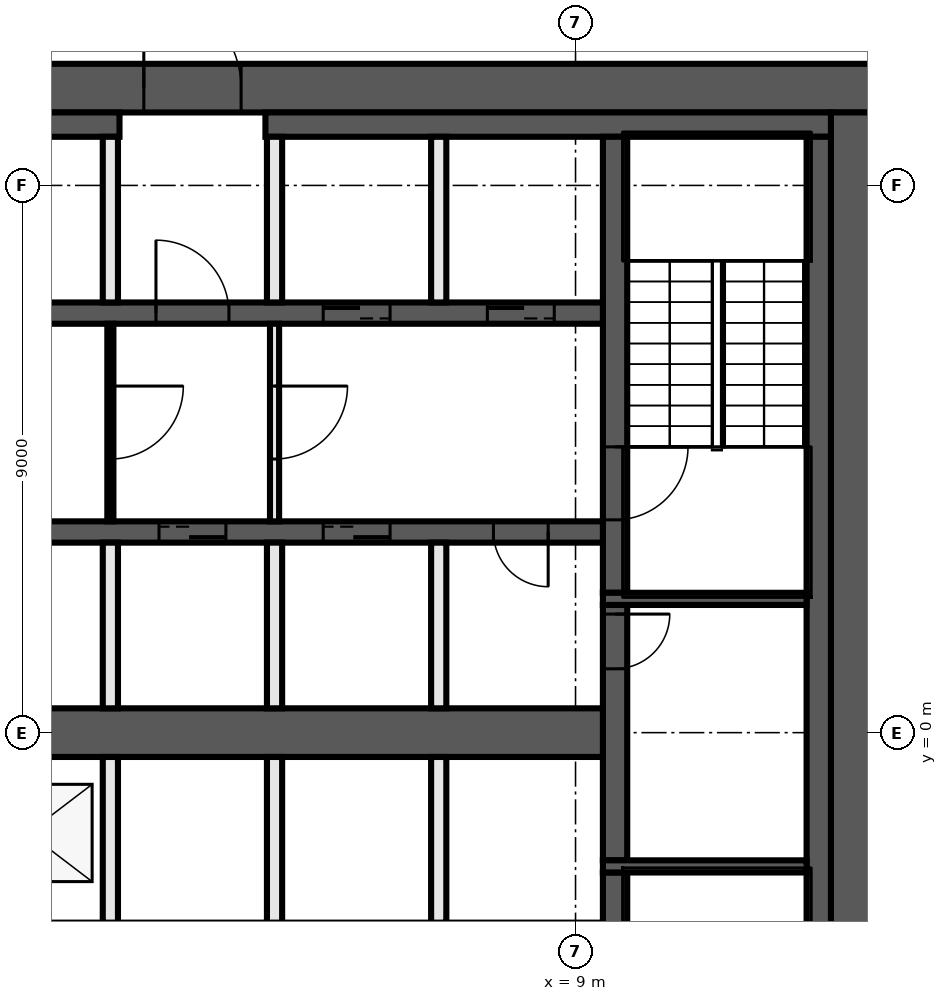
"""IFC4 building model, lengths in metres.
Left out: names, types, materials, properties, quantities, classifications, styles, units other than length and angle.
Written with IfcOpenShell. Run it as: python <this file> out.ifc"""

import sys

from ifc_helpers import new_model, si_unit, direction, frame, frame_2d, origin, place, context, subcontext, project, spatial, rectangle, extrude, element, fill, save


model = new_model("IFC4")
c1 = context("Model", 3, precision=1e-05, world=origin(), true_north=direction((0.0, 1.0)))
c2 = subcontext(c1, "Body", "Model", "MODEL_VIEW")
j1 = project(units=[si_unit("LENGTHUNIT", "METRE"), si_unit("PLANEANGLEUNIT", "RADIAN")], contexts=[c1])
p1 = place(None, origin())
s1 = spatial("IfcSite", under=j1, at=p1, CompositionType="ELEMENT")
p2 = place(p1, origin())
s2 = spatial("IfcBuilding", under=s1, at=p2, CompositionType="ELEMENT")
p3 = place(p2, frame((0.0, 0.0, 151.6)))
s3 = spatial("IfcBuildingStorey", under=s2, at=p3, CompositionType="ELEMENT", Elevation=151.6)
p4 = place(p3, frame((-14.0, 10.6, 0.0), z_axis=(0.0, 0.0, 1.0), x_axis=(1.0, 0.0, 0.0)))
e1 = element("IfcWall", 1, at=p4, inside=s3, PredefinedType="SHEAR", context=c2, shape_type="SweptSolid", body=[
    extrude(rectangle(XDim=28.0, YDim=0.8, at=frame_2d((14.0, 0.0))), origin(), (0.0, 0.0, 1.0), 6.62),
])
p5 = place(p4, frame((15.9, 0.0, 0.0)))
e2 = element("IfcOpeningElement", 2, at=p5, cuts=e1, PredefinedType="OPENING", context=c2, shape_type="SweptSolid", body=[
    extrude(rectangle(XDim=1.6, YDim=2.1, at=frame_2d((0.8, 1.05))), frame((0.0, 0.41, 0.0), z_axis=(0.0, -1.0, 0.0), x_axis=(1.0, 0.0, 0.0)), (0.0, 0.0, 1.0), 0.82),
])
p6 = place(p3, frame((13.6, 10.2, 0.0), z_axis=(0.0, 0.0, 1.0), x_axis=(0.0, -1.0, 0.0)))
e3 = element("IfcWall", 3, at=p6, inside=s3, PredefinedType="SHEAR", context=c2, shape_type="SweptSolid", body=[
    extrude(rectangle(XDim=20.4, YDim=0.8, at=frame_2d((10.2, 0.0))), origin(), (0.0, 0.0, 1.0), 6.62),
])
p7 = place(p3, frame((-13.2, 10.0, 0.0), z_axis=(0.0, 0.0, 1.0), x_axis=(1.0, 0.0, 0.0)))
e4 = element("IfcWall", 4, at=p7, inside=s3, PredefinedType="SHEAR", context=c2, shape_type="SweptSolid", body=[
    extrude(rectangle(XDim=14.7, YDim=0.4, at=frame_2d((7.35, 0.0))), origin(), (0.0, 0.0, 1.0), 6.62),
])
p8 = place(p3, frame((3.9, 10.0, 0.0), z_axis=(0.0, 0.0, 1.0), x_axis=(1.0, 0.0, 0.0)))
e5 = element("IfcWall", 5, at=p8, inside=s3, PredefinedType="SHEAR", context=c2, shape_type="SweptSolid", body=[
    extrude(rectangle(XDim=9.3, YDim=0.4, at=frame_2d((4.65, 0.0))), origin(), (0.0, 0.0, 1.0), 6.62),
])
p9 = place(p3, frame((13.0, 9.8, 0.0), z_axis=(0.0, 0.0, 1.0), x_axis=(0.0, -1.0, 0.0)))
e6 = element("IfcWall", 6, at=p9, inside=s3, PredefinedType="SHEAR", context=c2, shape_type="SweptSolid", body=[
    extrude(rectangle(XDim=19.6, YDim=0.4, at=frame_2d((9.8, 0.0))), origin(), (0.0, 0.0, 1.0), 6.62),
])
p10 = place(p3, frame((9.65, -2.3, 0.0), z_axis=(0.0, 0.0, 1.0), x_axis=(0.0, -1.0, 0.0)))
e7 = element("IfcWall", 7, at=p10, inside=s3, PredefinedType="SHEAR", context=c2, shape_type="SweptSolid", body=[
    extrude(rectangle(XDim=7.5, YDim=0.4, at=frame_2d((3.75, 0.0))), origin(), (0.0, 0.0, 1.0), 6.62),
])
p11 = place(p10, frame((1.2, 0.0, 0.0)))
e8 = element("IfcOpeningElement", 8, at=p11, cuts=e7, PredefinedType="OPENING", context=c2, shape_type="SweptSolid", body=[
    extrude(rectangle(XDim=1.2, YDim=2.1, at=frame_2d((0.6, 1.05))), frame((0.0, 0.21, 0.0), z_axis=(0.0, -1.0, 0.0), x_axis=(1.0, 0.0, 0.0)), (0.0, 0.0, 1.0), 0.42),
])
p12 = place(p3, frame((9.65, 2.1, 0.0), z_axis=(0.0, 0.0, 1.0), x_axis=(0.0, -1.0, 0.0)))
e9 = element("IfcWall", 9, at=p12, inside=s3, PredefinedType="SHEAR", context=c2, shape_type="SweptSolid", body=[
    extrude(rectangle(XDim=4.2, YDim=0.4, at=frame_2d((2.1, 0.0))), origin(), (0.0, 0.0, 1.0), 6.62),
])
p13 = place(p12, frame((0.15, 0.0, 0.0)))
e10 = element("IfcOpeningElement", 10, at=p13, cuts=e9, PredefinedType="OPENING", context=c2, shape_type="SweptSolid", body=[
    extrude(rectangle(XDim=0.9, YDim=2.1, at=frame_2d((0.45, 1.05))), frame((0.0, 0.21, 0.0), z_axis=(0.0, -1.0, 0.0), x_axis=(1.0, 0.0, 0.0)), (0.0, 0.0, 1.0), 0.42),
])
p14 = place(p3, frame((9.65, 9.8, 0.0), z_axis=(0.0, 0.0, 1.0), x_axis=(0.0, -1.0, 0.0)))
e11 = element("IfcWall", 11, at=p14, inside=s3, PredefinedType="SHEAR", context=c2, shape_type="SweptSolid", body=[
    extrude(rectangle(XDim=7.5, YDim=0.4, at=frame_2d((3.75, 0.0))), origin(), (0.0, 0.0, 1.0), 6.62),
])
p15 = place(p14, frame((5.1, 0.0, 0.0)))
e12 = element("IfcOpeningElement", 12, at=p15, cuts=e11, PredefinedType="OPENING", context=c2, shape_type="SweptSolid", body=[
    extrude(rectangle(XDim=1.2, YDim=2.1, at=frame_2d((0.6, 1.05))), frame((0.0, 0.21, 0.0), z_axis=(0.0, -1.0, 0.0), x_axis=(1.0, 0.0, 0.0)), (0.0, 0.0, 1.0), 0.42),
])
for number, where, z_axis, x_axis in (
    (13, (9.45, 2.2, 0.0), (0.0, 0.0, 1.0), (1.0, 0.0, 0.0)),
    (14, (9.45, -2.2, 0.0), (0.0, 0.0, 1.0), (1.0, 0.0, 0.0)),
):
    element("IfcWall", number, at=place(p3, frame(where, z_axis=z_axis, x_axis=x_axis)), inside=s3, PredefinedType="SHEAR", context=c2, shape_type="SweptSolid", body=[
        extrude(rectangle(XDim=3.35, YDim=0.2, at=frame_2d((1.675, 0.0))), origin(), (0.0, 0.0, 1.0), 6.62),
    ])
p16 = place(p3, frame((-9.45, 6.9, 0.0), z_axis=(0.0, 0.0, 1.0), x_axis=(1.0, 0.0, 0.0)))
e15 = element("IfcWall", 15, at=p16, inside=s3, PredefinedType="SHEAR", context=c2, shape_type="SweptSolid", body=[
    extrude(rectangle(XDim=18.9, YDim=0.35, at=frame_2d((9.45, 0.0))), origin(), (0.0, 0.0, 1.0), 6.62),
])
p17 = place(p16, frame((11.55, 0.0, 0.0)))
e16 = element("IfcOpeningElement", 16, at=p17, cuts=e15, PredefinedType="OPENING", context=c2, shape_type="SweptSolid", body=[
    extrude(rectangle(XDim=1.2, YDim=2.1, at=frame_2d((0.6, 1.05))), frame((0.0, 0.185, 0.0), z_axis=(0.0, -1.0, 0.0), x_axis=(1.0, 0.0, 0.0)), (0.0, 0.0, 1.0), 0.37),
])
p18 = place(p16, frame((14.3, 0.0, 0.0)))
e17 = element("IfcOpeningElement", 17, at=p18, cuts=e15, PredefinedType="OPENING", context=c2, shape_type="SweptSolid", body=[
    extrude(rectangle(XDim=1.1, YDim=2.1, at=frame_2d((0.55, 1.05))), frame((0.0, 0.185, 0.0), z_axis=(0.0, -1.0, 0.0), x_axis=(1.0, 0.0, 0.0)), (0.0, 0.0, 1.0), 0.37),
])
p19 = place(p16, frame((17.0, 0.0, 0.0)))
e18 = element("IfcOpeningElement", 18, at=p19, cuts=e15, PredefinedType="OPENING", context=c2, shape_type="SweptSolid", body=[
    extrude(rectangle(XDim=1.1, YDim=2.1, at=frame_2d((0.55, 1.05))), frame((0.0, 0.185, 0.0), z_axis=(0.0, -1.0, 0.0), x_axis=(1.0, 0.0, 0.0)), (0.0, 0.0, 1.0), 0.37),
])
p20 = place(p3, frame((9.45, 3.3, 0.0), z_axis=(0.0, 0.0, 1.0), x_axis=(-1.0, 0.0, 0.0)))
e19 = element("IfcWall", 19, at=p20, inside=s3, PredefinedType="SHEAR", context=c2, shape_type="SweptSolid", body=[
    extrude(rectangle(XDim=18.9, YDim=0.35, at=frame_2d((9.45, 0.0))), origin(), (0.0, 0.0, 1.0), 6.62),
])
p21 = place(p20, frame((6.2, 0.0, 0.0)))
e20 = element("IfcOpeningElement", 20, at=p21, cuts=e19, PredefinedType="OPENING", context=c2, shape_type="SweptSolid", body=[
    extrude(rectangle(XDim=1.1, YDim=2.1, at=frame_2d((0.55, 1.05))), frame((0.0, 0.185, 0.0), z_axis=(0.0, -1.0, 0.0), x_axis=(1.0, 0.0, 0.0)), (0.0, 0.0, 1.0), 0.37),
])
p22 = place(p20, frame((3.5, 0.0, 0.0)))
e21 = element("IfcOpeningElement", 21, at=p22, cuts=e19, PredefinedType="OPENING", context=c2, shape_type="SweptSolid", body=[
    extrude(rectangle(XDim=1.1, YDim=2.1, at=frame_2d((0.55, 1.05))), frame((0.0, 0.185, 0.0), z_axis=(0.0, -1.0, 0.0), x_axis=(1.0, 0.0, 0.0)), (0.0, 0.0, 1.0), 0.37),
])
p23 = place(p20, frame((0.9, 0.0, 0.0)))
e22 = element("IfcOpeningElement", 22, at=p23, cuts=e19, PredefinedType="OPENING", context=c2, shape_type="SweptSolid", body=[
    extrude(rectangle(XDim=0.9, YDim=2.1, at=frame_2d((0.45, 1.05))), frame((0.0, 0.185, 0.0), z_axis=(0.0, -1.0, 0.0), x_axis=(1.0, 0.0, 0.0)), (0.0, 0.0, 1.0), 0.37),
])
p24 = place(p3, frame((-9.45, 0.0, 0.0), z_axis=(0.0, 0.0, 1.0), x_axis=(1.0, 0.0, 0.0)))
e23 = element("IfcWall", 23, at=p24, inside=s3, PredefinedType="SHEAR", context=c2, shape_type="SweptSolid", body=[
    extrude(rectangle(XDim=18.9, YDim=0.8, at=frame_2d((9.45, 0.0))), origin(), (0.0, 0.0, 1.0), 6.62),
])
for number, where, z_axis, x_axis in (
    (24, (6.75, -3.125, 0.0), (0.0, 0.0, 1.0), (0.0, 1.0, 0.0)),
    (25, (6.75, 0.4, 0.0), (0.0, 0.0, 1.0), (0.0, 1.0, 0.0)),
    (26, (6.75, 7.075, 0.0), (0.0, 0.0, 1.0), (0.0, 1.0, 0.0)),
):
    element("IfcWall", number, at=place(p3, frame(where, z_axis=z_axis, x_axis=x_axis)), inside=s3, PredefinedType="SOLIDWALL", context=c2, shape_type="SweptSolid", body=[
        extrude(rectangle(XDim=2.725, YDim=0.25, at=frame_2d((1.363, 0.0))), origin(), (0.0, 0.0, 1.0), 6.62),
    ])
p25 = place(p3, frame((4.05, 6.725, 0.0), z_axis=(0.0, 0.0, 1.0), x_axis=(0.0, -1.0, 0.0)))
e27 = element("IfcWall", 27, at=p25, inside=s3, PredefinedType="PARTITIONING", context=c2, shape_type="SweptSolid", body=[
    extrude(rectangle(XDim=3.25, YDim=0.15, at=frame_2d((1.625, 0.0))), origin(), (0.0, 0.0, 1.0), 6.62),
])
p26 = place(p25, frame((1.025, 0.0, 0.0)))
e28 = element("IfcOpeningElement", 28, at=p26, cuts=e27, PredefinedType="OPENING", context=c2, shape_type="SweptSolid", body=[
    extrude(rectangle(XDim=1.2, YDim=2.1, at=frame_2d((0.6, 1.05))), frame((0.0, 0.085, 0.0), z_axis=(0.0, -1.0, 0.0), x_axis=(1.0, 0.0, 0.0)), (0.0, 0.0, 1.0), 0.17),
])
for number, where, z_axis, x_axis in (
    (29, (4.05, -3.125, 0.0), (0.0, 0.0, 1.0), (0.0, 1.0, 0.0)),
    (30, (4.05, 0.4, 0.0), (0.0, 0.0, 1.0), (0.0, 1.0, 0.0)),
    (31, (4.05, 7.075, 0.0), (0.0, 0.0, 1.0), (0.0, 1.0, 0.0)),
):
    element("IfcWall", number, at=place(p3, frame(where, z_axis=z_axis, x_axis=x_axis)), inside=s3, PredefinedType="SOLIDWALL", context=c2, shape_type="SweptSolid", body=[
        extrude(rectangle(XDim=2.725, YDim=0.25, at=frame_2d((1.363, 0.0))), origin(), (0.0, 0.0, 1.0), 6.62),
    ])
p27 = place(p3, frame((1.35, 6.725, 0.0), z_axis=(0.0, 0.0, 1.0), x_axis=(0.0, -1.0, 0.0)))
e32 = element("IfcWall", 32, at=p27, inside=s3, PredefinedType="PARTITIONING", context=c2, shape_type="SweptSolid", body=[
    extrude(rectangle(XDim=3.25, YDim=0.1, at=frame_2d((1.625, 0.0))), origin(), (0.0, 0.0, 1.0), 6.62),
])
p28 = place(p27, frame((1.025, 0.0, 0.0)))
e33 = element("IfcOpeningElement", 33, at=p28, cuts=e32, PredefinedType="OPENING", context=c2, shape_type="SweptSolid", body=[
    extrude(rectangle(XDim=1.2, YDim=2.1, at=frame_2d((0.6, 1.05))), frame((0.0, 0.06, 0.0), z_axis=(0.0, -1.0, 0.0), x_axis=(1.0, 0.0, 0.0)), (0.0, 0.0, 1.0), 0.12),
])
for number, where, z_axis, x_axis in (
    (34, (1.35, -3.125, 0.0), (0.0, 0.0, 1.0), (0.0, 1.0, 0.0)),
    (35, (1.35, 0.4, 0.0), (0.0, 0.0, 1.0), (0.0, 1.0, 0.0)),
    (36, (1.35, 7.075, 0.0), (0.0, 0.0, 1.0), (0.0, 1.0, 0.0)),
):
    element("IfcWall", number, at=place(p3, frame(where, z_axis=z_axis, x_axis=x_axis)), inside=s3, PredefinedType="SOLIDWALL", context=c2, shape_type="SweptSolid", body=[
        extrude(rectangle(XDim=2.725, YDim=0.25, at=frame_2d((1.363, 0.0))), origin(), (0.0, 0.0, 1.0), 6.62),
    ])
p29 = place(p13, origin())
e37 = element("IfcDoor", 37, at=p29, inside=s3, OperationType="SINGLE_SWING_RIGHT", PredefinedType="DOOR", context=c2, shape_type="SweptSolid", body=[
    extrude(rectangle(XDim=0.9, YDim=2.1, at=frame_2d((0.45, 1.05))), frame((0.0, 0.025, 0.0), z_axis=(0.0, -1.0, 0.0), x_axis=(1.0, 0.0, 0.0)), (0.0, 0.0, 1.0), 0.05),
])
fill(e10, e37)
p30 = place(p5, origin())
e38 = element("IfcDoor", 38, at=p30, inside=s3, OperationType="DOUBLE_DOOR_SINGLE_SWING", PredefinedType="DOOR", context=c2, shape_type="SweptSolid", body=[
    extrude(rectangle(XDim=1.6, YDim=2.1, at=frame_2d((0.8, 1.05))), frame((0.0, 0.025, 0.0), z_axis=(0.0, -1.0, 0.0), x_axis=(1.0, 0.0, 0.0)), (0.0, 0.0, 1.0), 0.05),
])
fill(e2, e38)
p31 = place(p17, origin())
e39 = element("IfcDoor", 39, at=p31, inside=s3, OperationType="SINGLE_SWING_LEFT", PredefinedType="DOOR", context=c2, shape_type="SweptSolid", body=[
    extrude(rectangle(XDim=1.2, YDim=2.1, at=frame_2d((0.6, 1.05))), frame((0.0, 0.025, 0.0), z_axis=(0.0, -1.0, 0.0), x_axis=(1.0, 0.0, 0.0)), (0.0, 0.0, 1.0), 0.05),
])
fill(e16, e39)
p32 = place(p18, origin())
e40 = element("IfcDoor", 40, at=p32, inside=s3, OperationType="DOUBLE_DOOR_SLIDING", PredefinedType="DOOR", context=c2, shape_type="SweptSolid", body=[
    extrude(rectangle(XDim=1.1, YDim=2.1, at=frame_2d((0.55, 1.05))), frame((0.0, 0.025, 0.0), z_axis=(0.0, -1.0, 0.0), x_axis=(1.0, 0.0, 0.0)), (0.0, 0.0, 1.0), 0.05),
])
fill(e17, e40)
p33 = place(p19, origin())
e41 = element("IfcDoor", 41, at=p33, inside=s3, OperationType="DOUBLE_DOOR_SLIDING", PredefinedType="DOOR", context=c2, shape_type="SweptSolid", body=[
    extrude(rectangle(XDim=1.1, YDim=2.1, at=frame_2d((0.55, 1.05))), frame((0.0, 0.025, 0.0), z_axis=(0.0, -1.0, 0.0), x_axis=(1.0, 0.0, 0.0)), (0.0, 0.0, 1.0), 0.05),
])
fill(e18, e41)
p34 = place(p21, origin())
e42 = element("IfcDoor", 42, at=p34, inside=s3, OperationType="DOUBLE_DOOR_SLIDING", PredefinedType="DOOR", context=c2, shape_type="SweptSolid", body=[
    extrude(rectangle(XDim=1.1, YDim=2.1, at=frame_2d((0.55, 1.05))), frame((0.0, 0.025, 0.0), z_axis=(0.0, -1.0, 0.0), x_axis=(1.0, 0.0, 0.0)), (0.0, 0.0, 1.0), 0.05),
])
fill(e20, e42)
p35 = place(p22, origin())
e43 = element("IfcDoor", 43, at=p35, inside=s3, OperationType="DOUBLE_DOOR_SLIDING", PredefinedType="DOOR", context=c2, shape_type="SweptSolid", body=[
    extrude(rectangle(XDim=1.1, YDim=2.1, at=frame_2d((0.55, 1.05))), frame((0.0, 0.025, 0.0), z_axis=(0.0, -1.0, 0.0), x_axis=(1.0, 0.0, 0.0)), (0.0, 0.0, 1.0), 0.05),
])
fill(e21, e43)
p36 = place(p23, origin())
e44 = element("IfcDoor", 44, at=p36, inside=s3, OperationType="SINGLE_SWING_LEFT", PredefinedType="DOOR", context=c2, shape_type="SweptSolid", body=[
    extrude(rectangle(XDim=0.9, YDim=2.1, at=frame_2d((0.45, 1.05))), frame((0.0, 0.025, 0.0), z_axis=(0.0, -1.0, 0.0), x_axis=(1.0, 0.0, 0.0)), (0.0, 0.0, 1.0), 0.05),
])
fill(e22, e44)
p37 = place(p15, origin())
e45 = element("IfcDoor", 45, at=p37, inside=s3, OperationType="SINGLE_SWING_LEFT", PredefinedType="DOOR", context=c2, shape_type="SweptSolid", body=[
    extrude(rectangle(XDim=1.2, YDim=2.1, at=frame_2d((0.6, 1.05))), frame((0.0, 0.025, 0.0), z_axis=(0.0, -1.0, 0.0), x_axis=(1.0, 0.0, 0.0)), (0.0, 0.0, 1.0), 0.05),
])
fill(e12, e45)
p38 = place(p28, origin())
e46 = element("IfcDoor", 46, at=p38, inside=s3, OperationType="SINGLE_SWING_LEFT", PredefinedType="DOOR", context=c2, shape_type="SweptSolid", body=[
    extrude(rectangle(XDim=1.2, YDim=2.1, at=frame_2d((0.6, 1.05))), frame((0.0, 0.025, 0.0), z_axis=(0.0, -1.0, 0.0), x_axis=(1.0, 0.0, 0.0)), (0.0, 0.0, 1.0), 0.05),
])
fill(e33, e46)
p39 = place(p26, origin())
e47 = element("IfcDoor", 47, at=p39, inside=s3, OperationType="SINGLE_SWING_RIGHT", PredefinedType="DOOR", context=c2, shape_type="SweptSolid", body=[
    extrude(rectangle(XDim=1.2, YDim=2.1, at=frame_2d((0.6, 1.05))), frame((0.0, 0.025, 0.0), z_axis=(0.0, -1.0, 0.0), x_axis=(1.0, 0.0, 0.0)), (0.0, 0.0, 1.0), 0.05),
])
fill(e28, e47)
save(model, sys.argv[1])
